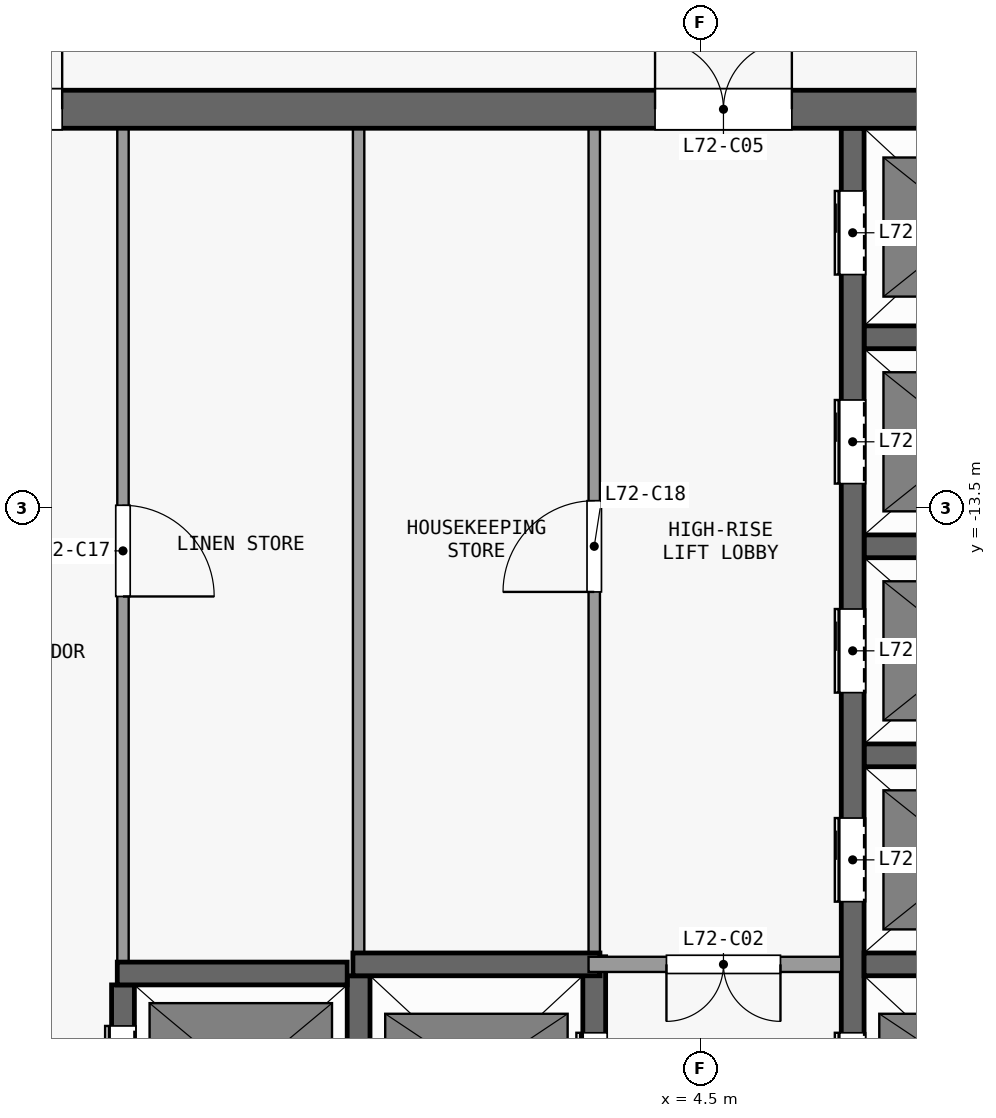
"""IFC4 building model, lengths in metres.
Left out: names, types, materials, properties, quantities, classifications, styles, units other than length and angle.
Written with IfcOpenShell. Run it as: python <this file> out.ifc"""

import sys

from ifc_helpers import new_model, si_unit, direction, frame, frame_2d, origin, place, context, subcontext, project, spatial, rectangle, extrude, element, fill, save


model = new_model("IFC4")
c1 = context("Model", 3, precision=1e-05, world=origin(), true_north=direction((0.0, 1.0)))
c2 = subcontext(c1, "Body", "Model", "MODEL_VIEW")
j1 = project(units=[si_unit("LENGTHUNIT", "METRE"), si_unit("PLANEANGLEUNIT", "RADIAN")], contexts=[c1])
p1 = place(None, origin())
s1 = spatial("IfcSite", under=j1, at=p1, CompositionType="ELEMENT")
p2 = place(p1, origin())
s2 = spatial("IfcBuilding", under=s1, at=p2, CompositionType="ELEMENT")
p3 = place(p2, frame((0.0, 0.0, 284.3)))
s3 = spatial("IfcBuildingStorey", under=s2, at=p3, CompositionType="ELEMENT", Elevation=284.3)
p4 = place(p3, frame((-13.1, -8.25, 0.0), z_axis=(0.0, 0.0, 1.0), x_axis=(1.0, 0.0, 0.0)))
e1 = element("IfcWall", 1, at=p4, inside=s3, PredefinedType="SHEAR", context=c2, shape_type="SweptSolid", body=[
    extrude(rectangle(XDim=26.2, YDim=0.5, at=frame_2d((13.1, 0.0))), origin(), (0.0, 0.0, 1.0), 3.3),
])
p5 = place(p4, frame((7.4, 0.0, 0.0)))
e2 = element("IfcOpeningElement", 2, at=p5, cuts=e1, PredefinedType="OPENING", context=c2, shape_type="SweptSolid", body=[
    extrude(rectangle(XDim=1.8, YDim=2.1, at=frame_2d((0.9, 1.05))), frame((0.0, 0.26, 0.0), z_axis=(0.0, -1.0, 0.0), x_axis=(1.0, 0.0, 0.0)), (0.0, 0.0, 1.0), 0.52),
])
p6 = place(p4, frame((17.0, 0.0, 0.0)))
e3 = element("IfcOpeningElement", 3, at=p6, cuts=e1, PredefinedType="OPENING", context=c2, shape_type="SweptSolid", body=[
    extrude(rectangle(XDim=1.8, YDim=2.1, at=frame_2d((0.9, 1.05))), frame((0.0, 0.26, 0.0), z_axis=(0.0, -1.0, 0.0), x_axis=(1.0, 0.0, 0.0)), (0.0, 0.0, 1.0), 0.52),
])
p7 = place(p4, frame((2.325, 0.0, 0.0)))
e4 = element("IfcOpeningElement", 4, at=p7, cuts=e1, PredefinedType="OPENING", context=c2, shape_type="SweptSolid", body=[
    extrude(rectangle(XDim=0.9, YDim=2.1, at=frame_2d((0.45, 1.05))), frame((0.0, 0.26, 0.0), z_axis=(0.0, -1.0, 0.0), x_axis=(1.0, 0.0, 0.0)), (0.0, 0.0, 1.0), 0.52),
])
p8 = place(p4, frame((22.975, 0.0, 0.0)))
e5 = element("IfcOpeningElement", 5, at=p8, cuts=e1, PredefinedType="OPENING", context=c2, shape_type="SweptSolid", body=[
    extrude(rectangle(XDim=0.9, YDim=2.1, at=frame_2d((0.45, 1.05))), frame((0.0, 0.26, 0.0), z_axis=(0.0, -1.0, 0.0), x_axis=(1.0, 0.0, 0.0)), (0.0, 0.0, 1.0), 0.52),
])
p9 = place(p3, frame((-3.175, -19.62, 0.0), z_axis=(0.0, 0.0, 1.0), x_axis=(1.0, 0.0, 0.0)))
e6 = element("IfcWall", 6, at=p9, inside=s3, PredefinedType="SHEAR", context=c2, shape_type="SweptSolid", body=[
    extrude(rectangle(XDim=3.025, YDim=0.3, at=frame_2d((1.513, 0.0))), origin(), (0.0, 0.0, 1.0), 3.3),
])
p10 = place(p3, frame((-0.075, -19.5, 0.0), z_axis=(0.0, 0.0, 1.0), x_axis=(1.0, 0.0, 0.0)))
e7 = element("IfcWall", 7, at=p10, inside=s3, PredefinedType="SHEAR", context=c2, shape_type="SweptSolid", body=[
    extrude(rectangle(XDim=3.25, YDim=0.3, at=frame_2d((1.625, 0.0))), origin(), (0.0, 0.0, 1.0), 3.3),
])
p11 = place(p3, frame((6.35, -19.5, 0.0), z_axis=(0.0, 0.0, 1.0), x_axis=(-1.0, 0.0, 0.0)))
e8 = element("IfcWall", 8, at=p11, inside=s3, PredefinedType="PARTITIONING", context=c2, shape_type="SweptSolid", body=[
    extrude(rectangle(XDim=3.325, YDim=0.2, at=frame_2d((1.663, 0.0))), origin(), (0.0, 0.0, 1.0), 3.3),
])
p12 = place(p11, frame((0.8, 0.0, 0.0)))
e9 = element("IfcOpeningElement", 9, at=p12, cuts=e8, PredefinedType="OPENING", context=c2, shape_type="SweptSolid", body=[
    extrude(rectangle(XDim=1.5, YDim=2.1, at=frame_2d((0.75, 1.05))), frame((0.0, 0.11, 0.0), z_axis=(0.0, -1.0, 0.0), x_axis=(1.0, 0.0, 0.0)), (0.0, 0.0, 1.0), 0.22),
])
for number, where, z_axis, x_axis in (
    (10, (6.65, -19.5, 0.0), (0.0, 0.0, 1.0), (1.0, 0.0, 0.0)),
    (11, (6.65, -16.75, 0.0), (0.0, 0.0, 1.0), (1.0, 0.0, 0.0)),
    (12, (6.65, -14.0, 0.0), (0.0, 0.0, 1.0), (1.0, 0.0, 0.0)),
    (13, (6.65, -11.25, 0.0), (0.0, 0.0, 1.0), (1.0, 0.0, 0.0)),
):
    element("IfcWall", number, at=place(p3, frame(where, z_axis=z_axis, x_axis=x_axis)), inside=s3, PredefinedType="SHEAR", context=c2, shape_type="SweptSolid", body=[
        extrude(rectangle(XDim=2.8, YDim=0.3, at=frame_2d((1.4, 0.0))), origin(), (0.0, 0.0, 1.0), 3.3),
    ])
p13 = place(p3, frame((-3.1, -22.25, 0.0), z_axis=(0.0, 0.0, 1.0), x_axis=(0.0, 1.0, 0.0)))
e14 = element("IfcWall", 14, at=p13, inside=s3, PredefinedType="SHEAR", context=c2, shape_type="SweptSolid", body=[
    extrude(rectangle(XDim=2.48, YDim=0.3, at=frame_2d((1.24, 0.0))), origin(), (0.0, 0.0, 1.0), 3.3),
])
p14 = place(p13, frame((0.54, 0.0, 0.0)))
e15 = element("IfcOpeningElement", 15, at=p14, cuts=e14, PredefinedType="OPENING", context=c2, shape_type="SweptSolid", body=[
    extrude(rectangle(XDim=1.4, YDim=2.1, at=frame_2d((0.7, 1.05))), frame((0.0, 0.16, 0.0), z_axis=(0.0, -1.0, 0.0), x_axis=(1.0, 0.0, 0.0)), (0.0, 0.0, 1.0), 0.32),
])
p15 = place(p3, frame((-3.1, -8.5, 0.0), z_axis=(0.0, 0.0, 1.0), x_axis=(0.0, -1.0, 0.0)))
e16 = element("IfcWall", 16, at=p15, inside=s3, PredefinedType="PARTITIONING", context=c2, shape_type="SweptSolid", body=[
    extrude(rectangle(XDim=10.97, YDim=0.15, at=frame_2d((5.485, 0.0))), origin(), (0.0, 0.0, 1.0), 3.3),
])
p16 = place(p15, frame((4.96, 0.0, 0.0)))
e17 = element("IfcOpeningElement", 17, at=p16, cuts=e16, PredefinedType="OPENING", context=c2, shape_type="SweptSolid", body=[
    extrude(rectangle(XDim=1.2, YDim=2.1, at=frame_2d((0.6, 1.05))), frame((0.0, 0.085, 0.0), z_axis=(0.0, -1.0, 0.0), x_axis=(1.0, 0.0, 0.0)), (0.0, 0.0, 1.0), 0.17),
])
p17 = place(p3, frame((0.0, -22.25, 0.0), z_axis=(0.0, 0.0, 1.0), x_axis=(0.0, 1.0, 0.0)))
e18 = element("IfcWall", 18, at=p17, inside=s3, PredefinedType="SHEAR", context=c2, shape_type="SweptSolid", body=[
    extrude(rectangle(XDim=2.6, YDim=0.3, at=frame_2d((1.3, 0.0))), origin(), (0.0, 0.0, 1.0), 3.3),
])
p18 = place(p3, frame((0.0, -19.35, 0.0), z_axis=(0.0, 0.0, 1.0), x_axis=(0.0, 1.0, 0.0)))
e19 = element("IfcWall", 19, at=p18, inside=s3, PredefinedType="PARTITIONING", context=c2, shape_type="SweptSolid", body=[
    extrude(rectangle(XDim=10.85, YDim=0.15, at=frame_2d((5.425, 0.0))), origin(), (0.0, 0.0, 1.0), 3.3),
])
p19 = place(p3, frame((3.1, -22.25, 0.0), z_axis=(0.0, 0.0, 1.0), x_axis=(0.0, 1.0, 0.0)))
e20 = element("IfcWall", 20, at=p19, inside=s3, PredefinedType="SHEAR", context=c2, shape_type="SweptSolid", body=[
    extrude(rectangle(XDim=2.85, YDim=0.3, at=frame_2d((1.425, 0.0))), origin(), (0.0, 0.0, 1.0), 3.3),
])
p20 = place(p19, frame((0.75, 0.0, 0.0)))
e21 = element("IfcOpeningElement", 21, at=p20, cuts=e20, PredefinedType="OPENING", context=c2, shape_type="SweptSolid", body=[
    extrude(rectangle(XDim=1.1, YDim=2.1, at=frame_2d((0.55, 1.05))), frame((0.0, 0.16, 0.0), z_axis=(0.0, -1.0, 0.0), x_axis=(1.0, 0.0, 0.0)), (0.0, 0.0, 1.0), 0.32),
])
p21 = place(p3, frame((3.1, -19.4, 0.0), z_axis=(0.0, 0.0, 1.0), x_axis=(0.0, 1.0, 0.0)))
e22 = element("IfcWall", 22, at=p21, inside=s3, PredefinedType="PARTITIONING", context=c2, shape_type="SweptSolid", body=[
    extrude(rectangle(XDim=10.9, YDim=0.15, at=frame_2d((5.45, 0.0))), origin(), (0.0, 0.0, 1.0), 3.3),
])
p22 = place(p21, frame((4.8, 0.0, 0.0)))
e23 = element("IfcOpeningElement", 23, at=p22, cuts=e22, PredefinedType="OPENING", context=c2, shape_type="SweptSolid", body=[
    extrude(rectangle(XDim=1.2, YDim=2.1, at=frame_2d((0.6, 1.05))), frame((0.0, 0.085, 0.0), z_axis=(0.0, -1.0, 0.0), x_axis=(1.0, 0.0, 0.0)), (0.0, 0.0, 1.0), 0.17),
])
p23 = place(p3, frame((6.5, -22.55, 0.0), z_axis=(0.0, 0.0, 1.0), x_axis=(0.0, 1.0, 0.0)))
e24 = element("IfcWall", 24, at=p23, inside=s3, PredefinedType="SHEAR", context=c2, shape_type="SweptSolid", body=[
    extrude(rectangle(XDim=14.05, YDim=0.3, at=frame_2d((7.025, 0.0))), origin(), (0.0, 0.0, 1.0), 3.3),
])
p24 = place(p23, frame((1.05, 0.0, 0.0)))
e25 = element("IfcOpeningElement", 25, at=p24, cuts=e24, PredefinedType="OPENING", context=c2, shape_type="SweptSolid", body=[
    extrude(rectangle(XDim=1.1, YDim=2.1, at=frame_2d((0.55, 1.05))), frame((0.0, 0.16, 0.0), z_axis=(0.0, -1.0, 0.0), x_axis=(1.0, 0.0, 0.0)), (0.0, 0.0, 1.0), 0.32),
])
p25 = place(p23, frame((3.875, 0.0, 0.0)))
e26 = element("IfcOpeningElement", 26, at=p25, cuts=e24, PredefinedType="OPENING", context=c2, shape_type="SweptSolid", body=[
    extrude(rectangle(XDim=1.1, YDim=2.1, at=frame_2d((0.55, 1.05))), frame((0.0, 0.16, 0.0), z_axis=(0.0, -1.0, 0.0), x_axis=(1.0, 0.0, 0.0)), (0.0, 0.0, 1.0), 0.32),
])
p26 = place(p23, frame((6.625, 0.0, 0.0)))
e27 = element("IfcOpeningElement", 27, at=p26, cuts=e24, PredefinedType="OPENING", context=c2, shape_type="SweptSolid", body=[
    extrude(rectangle(XDim=1.1, YDim=2.1, at=frame_2d((0.55, 1.05))), frame((0.0, 0.16, 0.0), z_axis=(0.0, -1.0, 0.0), x_axis=(1.0, 0.0, 0.0)), (0.0, 0.0, 1.0), 0.32),
])
p27 = place(p23, frame((9.375, 0.0, 0.0)))
e28 = element("IfcOpeningElement", 28, at=p27, cuts=e24, PredefinedType="OPENING", context=c2, shape_type="SweptSolid", body=[
    extrude(rectangle(XDim=1.1, YDim=2.1, at=frame_2d((0.55, 1.05))), frame((0.0, 0.16, 0.0), z_axis=(0.0, -1.0, 0.0), x_axis=(1.0, 0.0, 0.0)), (0.0, 0.0, 1.0), 0.32),
])
p28 = place(p23, frame((12.125, 0.0, 0.0)))
e29 = element("IfcOpeningElement", 29, at=p28, cuts=e24, PredefinedType="OPENING", context=c2, shape_type="SweptSolid", body=[
    extrude(rectangle(XDim=1.1, YDim=2.1, at=frame_2d((0.55, 1.05))), frame((0.0, 0.16, 0.0), z_axis=(0.0, -1.0, 0.0), x_axis=(1.0, 0.0, 0.0)), (0.0, 0.0, 1.0), 0.32),
])
p29 = place(p20, origin())
e30 = element("IfcDoor", 30, at=p29, inside=s3, OperationType="DOUBLE_DOOR_SLIDING", PredefinedType="DOOR", context=c2, shape_type="SweptSolid", body=[
    extrude(rectangle(XDim=1.1, YDim=2.1, at=frame_2d((0.55, 1.05))), frame((0.0, 0.025, 0.0), z_axis=(0.0, -1.0, 0.0), x_axis=(1.0, 0.0, 0.0)), (0.0, 0.0, 1.0), 0.05),
])
fill(e21, e30)
p30 = place(p24, origin())
e31 = element("IfcDoor", 31, at=p30, inside=s3, OperationType="DOUBLE_DOOR_SLIDING", PredefinedType="DOOR", context=c2, shape_type="SweptSolid", body=[
    extrude(rectangle(XDim=1.1, YDim=2.1, at=frame_2d((0.55, 1.05))), frame((0.0, 0.025, 0.0), z_axis=(0.0, -1.0, 0.0), x_axis=(1.0, 0.0, 0.0)), (0.0, 0.0, 1.0), 0.05),
])
fill(e25, e31)
p31 = place(p25, origin())
e32 = element("IfcDoor", 32, at=p31, inside=s3, OperationType="DOUBLE_DOOR_SLIDING", PredefinedType="DOOR", context=c2, shape_type="SweptSolid", body=[
    extrude(rectangle(XDim=1.1, YDim=2.1, at=frame_2d((0.55, 1.05))), frame((0.0, 0.025, 0.0), z_axis=(0.0, -1.0, 0.0), x_axis=(1.0, 0.0, 0.0)), (0.0, 0.0, 1.0), 0.05),
])
fill(e26, e32)
p32 = place(p26, origin())
e33 = element("IfcDoor", 33, at=p32, inside=s3, OperationType="DOUBLE_DOOR_SLIDING", PredefinedType="DOOR", context=c2, shape_type="SweptSolid", body=[
    extrude(rectangle(XDim=1.1, YDim=2.1, at=frame_2d((0.55, 1.05))), frame((0.0, 0.025, 0.0), z_axis=(0.0, -1.0, 0.0), x_axis=(1.0, 0.0, 0.0)), (0.0, 0.0, 1.0), 0.05),
])
fill(e27, e33)
p33 = place(p27, origin())
e34 = element("IfcDoor", 34, at=p33, inside=s3, OperationType="DOUBLE_DOOR_SLIDING", PredefinedType="DOOR", context=c2, shape_type="SweptSolid", body=[
    extrude(rectangle(XDim=1.1, YDim=2.1, at=frame_2d((0.55, 1.05))), frame((0.0, 0.025, 0.0), z_axis=(0.0, -1.0, 0.0), x_axis=(1.0, 0.0, 0.0)), (0.0, 0.0, 1.0), 0.05),
])
fill(e28, e34)
p34 = place(p28, origin())
e35 = element("IfcDoor", 35, at=p34, inside=s3, OperationType="DOUBLE_DOOR_SLIDING", PredefinedType="DOOR", context=c2, shape_type="SweptSolid", body=[
    extrude(rectangle(XDim=1.1, YDim=2.1, at=frame_2d((0.55, 1.05))), frame((0.0, 0.025, 0.0), z_axis=(0.0, -1.0, 0.0), x_axis=(1.0, 0.0, 0.0)), (0.0, 0.0, 1.0), 0.05),
])
fill(e29, e35)
p35 = place(p14, origin())
e36 = element("IfcDoor", 36, at=p35, inside=s3, OperationType="DOUBLE_DOOR_SLIDING", PredefinedType="DOOR", context=c2, shape_type="SweptSolid", body=[
    extrude(rectangle(XDim=1.4, YDim=2.1, at=frame_2d((0.7, 1.05))), frame((0.0, 0.025, 0.0), z_axis=(0.0, -1.0, 0.0), x_axis=(1.0, 0.0, 0.0)), (0.0, 0.0, 1.0), 0.05),
])
fill(e15, e36)
p36 = place(p12, origin())
e37 = element("IfcDoor", 37, at=p36, inside=s3, OperationType="DOUBLE_DOOR_SINGLE_SWING", PredefinedType="DOOR", context=c2, shape_type="SweptSolid", body=[
    extrude(rectangle(XDim=1.5, YDim=2.1, at=frame_2d((0.75, 1.05))), frame((0.0, 0.025, 0.0), z_axis=(0.0, -1.0, 0.0), x_axis=(1.0, 0.0, 0.0)), (0.0, 0.0, 1.0), 0.05),
])
fill(e9, e37)
p37 = place(p5, origin())
e38 = element("IfcDoor", 38, at=p37, inside=s3, OperationType="DOUBLE_DOOR_SINGLE_SWING", PredefinedType="DOOR", context=c2, shape_type="SweptSolid", body=[
    extrude(rectangle(XDim=1.8, YDim=2.1, at=frame_2d((0.9, 1.05))), frame((0.0, 0.025, 0.0), z_axis=(0.0, -1.0, 0.0), x_axis=(1.0, 0.0, 0.0)), (0.0, 0.0, 1.0), 0.05),
])
fill(e2, e38)
p38 = place(p6, origin())
e39 = element("IfcDoor", 39, at=p38, inside=s3, OperationType="DOUBLE_DOOR_SINGLE_SWING", PredefinedType="DOOR", context=c2, shape_type="SweptSolid", body=[
    extrude(rectangle(XDim=1.8, YDim=2.1, at=frame_2d((0.9, 1.05))), frame((0.0, 0.025, 0.0), z_axis=(0.0, -1.0, 0.0), x_axis=(1.0, 0.0, 0.0)), (0.0, 0.0, 1.0), 0.05),
])
fill(e3, e39)
p39 = place(p16, origin())
e40 = element("IfcDoor", 40, at=p39, inside=s3, OperationType="SINGLE_SWING_RIGHT", PredefinedType="DOOR", context=c2, shape_type="SweptSolid", body=[
    extrude(rectangle(XDim=1.2, YDim=2.1, at=frame_2d((0.6, 1.05))), frame((0.0, 0.025, 0.0), z_axis=(0.0, -1.0, 0.0), x_axis=(1.0, 0.0, 0.0)), (0.0, 0.0, 1.0), 0.05),
])
fill(e17, e40)
p40 = place(p22, origin())
e41 = element("IfcDoor", 41, at=p40, inside=s3, OperationType="SINGLE_SWING_LEFT", PredefinedType="DOOR", context=c2, shape_type="SweptSolid", body=[
    extrude(rectangle(XDim=1.2, YDim=2.1, at=frame_2d((0.6, 1.05))), frame((0.0, 0.025, 0.0), z_axis=(0.0, -1.0, 0.0), x_axis=(1.0, 0.0, 0.0)), (0.0, 0.0, 1.0), 0.05),
])
fill(e23, e41)
save(model, sys.argv[1])
